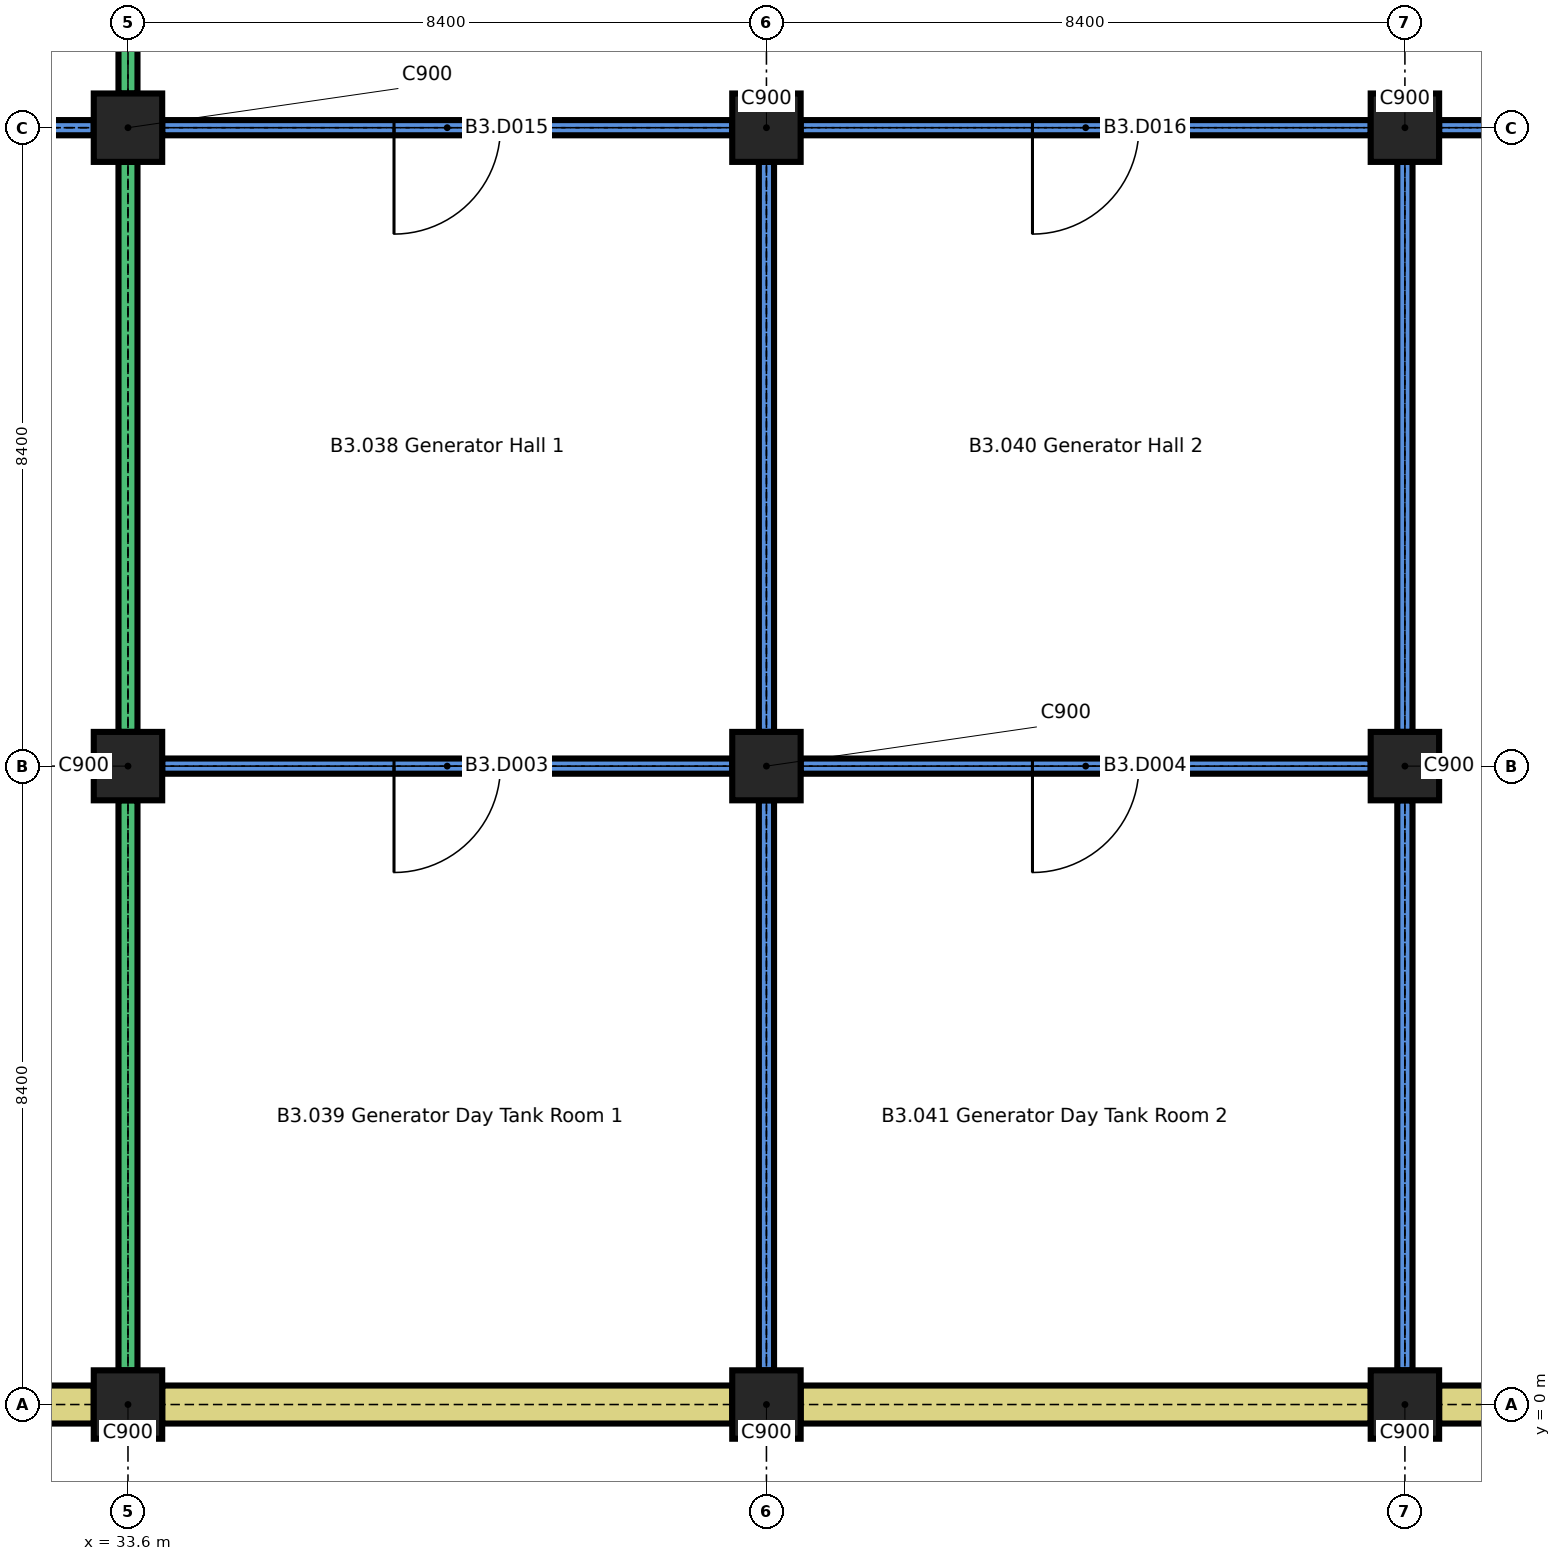
"""IFC4 building model, lengths in metres.
Left out: names, types, materials, properties, quantities, classifications, styles, units other than length and angle.
Written with IfcOpenShell. Run it as: python <this file> out.ifc"""

import sys

from ifc_helpers import new_model, si_unit, direction, frame, frame_2d, origin, origin_2d, place, context, subcontext, project, spatial, rectangle, extrude, element, fill, save


model = new_model("IFC4")
c1 = context("Model", 3, precision=1e-05, world=origin(), true_north=direction((0.0, 1.0)))
c2 = subcontext(c1, "Body", "Model", "MODEL_VIEW")
j1 = project(units=[si_unit("LENGTHUNIT", "METRE"), si_unit("PLANEANGLEUNIT", "RADIAN")], contexts=[c1])
p1 = place(None, origin())
s1 = spatial("IfcSite", under=j1, at=p1, CompositionType="ELEMENT")
p2 = place(p1, origin())
s2 = spatial("IfcBuilding", under=s1, at=p2, CompositionType="ELEMENT")
p3 = place(p2, frame((0.0, 0.0, -11.4)))
s3 = spatial("IfcBuildingStorey", under=s2, at=p3, CompositionType="ELEMENT", Elevation=-11.4)
for number, where, z_axis, x_axis in (
    (1, (33.6, 0.0, 0.0), (0.0, 0.0, 1.0), (1.0, 0.0, 0.0)),
    (2, (42.0, 0.0, 0.0), (0.0, 0.0, 1.0), (1.0, 0.0, 0.0)),
    (3, (50.4, 0.0, 0.0), (0.0, 0.0, 1.0), (1.0, 0.0, 0.0)),
    (4, (33.6, 8.4, 0.0), (0.0, 0.0, 1.0), (1.0, 0.0, 0.0)),
    (5, (42.0, 8.4, 0.0), (0.0, 0.0, 1.0), (1.0, 0.0, 0.0)),
    (6, (50.4, 8.4, 0.0), (0.0, 0.0, 1.0), (1.0, 0.0, 0.0)),
    (7, (33.6, 16.8, 0.0), (0.0, 0.0, 1.0), (1.0, 0.0, 0.0)),
    (8, (42.0, 16.8, 0.0), (0.0, 0.0, 1.0), (1.0, 0.0, 0.0)),
    (9, (50.4, 16.8, 0.0), (0.0, 0.0, 1.0), (1.0, 0.0, 0.0)),
):
    element("IfcColumn", number, at=place(p3, frame(where, z_axis=z_axis, x_axis=x_axis)), inside=s3, PredefinedType="COLUMN", context=c2, shape_type="SweptSolid", body=[
        extrude(rectangle(XDim=0.9, YDim=0.9, at=origin_2d()), origin(), (0.0, 0.0, 1.0), 3.2),
    ])
for number, where, z_axis, x_axis in (
    (10, (25.65, 0.0, 0.0), (0.0, 0.0, 1.0), (1.0, 0.0, 0.0)),
    (11, (34.05, 0.0, 0.0), (0.0, 0.0, 1.0), (1.0, 0.0, 0.0)),
    (12, (42.45, 0.0, 0.0), (0.0, 0.0, 1.0), (1.0, 0.0, 0.0)),
    (13, (50.85, 0.0, 0.0), (0.0, 0.0, 1.0), (1.0, 0.0, 0.0)),
):
    element("IfcWall", number, at=place(p3, frame(where, z_axis=z_axis, x_axis=x_axis)), inside=s3, PredefinedType="SOLIDWALL", context=c2, shape_type="SweptSolid", body=[
        extrude(rectangle(XDim=7.5, YDim=0.5, at=frame_2d((3.75, 0.0))), origin(), (0.0, 0.0, 1.0), 3.2),
    ])
p4 = place(p3, frame((34.05, 8.4, 0.0), z_axis=(0.0, 0.0, 1.0), x_axis=(1.0, 0.0, 0.0)))
e14 = element("IfcWall", 14, at=p4, inside=s3, PredefinedType="PARTITIONING", context=c2, shape_type="SweptSolid", body=[
    extrude(rectangle(XDim=7.5, YDim=0.2, at=frame_2d((3.75, 0.0))), origin(), (0.0, 0.0, 1.0), 3.2),
])
p5 = place(p4, frame((3.05, 0.0, 0.0)))
e15 = element("IfcOpeningElement", 15, at=p5, cuts=e14, PredefinedType="OPENING", context=c2, shape_type="SweptSolid", body=[
    extrude(rectangle(XDim=1.4, YDim=2.1, at=frame_2d((0.7, 1.05))), frame((0.0, 0.11, 0.0), z_axis=(0.0, -1.0, 0.0), x_axis=(1.0, 0.0, 0.0)), (0.0, 0.0, 1.0), 0.22),
])
p6 = place(p3, frame((42.45, 8.4, 0.0), z_axis=(0.0, 0.0, 1.0), x_axis=(1.0, 0.0, 0.0)))
e16 = element("IfcWall", 16, at=p6, inside=s3, PredefinedType="PARTITIONING", context=c2, shape_type="SweptSolid", body=[
    extrude(rectangle(XDim=7.5, YDim=0.2, at=frame_2d((3.75, 0.0))), origin(), (0.0, 0.0, 1.0), 3.2),
])
p7 = place(p6, frame((3.05, 0.0, 0.0)))
e17 = element("IfcOpeningElement", 17, at=p7, cuts=e16, PredefinedType="OPENING", context=c2, shape_type="SweptSolid", body=[
    extrude(rectangle(XDim=1.4, YDim=2.1, at=frame_2d((0.7, 1.05))), frame((0.0, 0.11, 0.0), z_axis=(0.0, -1.0, 0.0), x_axis=(1.0, 0.0, 0.0)), (0.0, 0.0, 1.0), 0.22),
])
p8 = place(p3, frame((17.25, 16.8, 0.0), z_axis=(0.0, 0.0, 1.0), x_axis=(1.0, 0.0, 0.0)))
e18 = element("IfcWall", 18, at=p8, inside=s3, PredefinedType="PARTITIONING", context=c2, shape_type="SweptSolid", body=[
    extrude(rectangle(XDim=15.9, YDim=0.2, at=frame_2d((7.95, 0.0))), origin(), (0.0, 0.0, 1.0), 3.2),
])
p9 = place(p8, frame((3.275, 0.0, 0.0)))
e19 = element("IfcOpeningElement", 19, at=p9, cuts=e18, PredefinedType="OPENING", context=c2, shape_type="SweptSolid", body=[
    extrude(rectangle(XDim=1.4, YDim=2.1, at=frame_2d((0.7, 1.05))), frame((0.0, 0.11, 0.0), z_axis=(0.0, -1.0, 0.0), x_axis=(1.0, 0.0, 0.0)), (0.0, 0.0, 1.0), 0.22),
])
p10 = place(p8, frame((13.325, 0.0, 0.0)))
e20 = element("IfcOpeningElement", 20, at=p10, cuts=e18, PredefinedType="OPENING", context=c2, shape_type="SweptSolid", body=[
    extrude(rectangle(XDim=1.4, YDim=2.1, at=frame_2d((0.7, 1.05))), frame((0.0, 0.11, 0.0), z_axis=(0.0, -1.0, 0.0), x_axis=(1.0, 0.0, 0.0)), (0.0, 0.0, 1.0), 0.22),
])
p11 = place(p3, frame((34.05, 16.8, 0.0), z_axis=(0.0, 0.0, 1.0), x_axis=(1.0, 0.0, 0.0)))
e21 = element("IfcWall", 21, at=p11, inside=s3, PredefinedType="PARTITIONING", context=c2, shape_type="SweptSolid", body=[
    extrude(rectangle(XDim=7.5, YDim=0.2, at=frame_2d((3.75, 0.0))), origin(), (0.0, 0.0, 1.0), 3.2),
])
p12 = place(p11, frame((3.05, 0.0, 0.0)))
e22 = element("IfcOpeningElement", 22, at=p12, cuts=e21, PredefinedType="OPENING", context=c2, shape_type="SweptSolid", body=[
    extrude(rectangle(XDim=1.4, YDim=2.1, at=frame_2d((0.7, 1.05))), frame((0.0, 0.11, 0.0), z_axis=(0.0, -1.0, 0.0), x_axis=(1.0, 0.0, 0.0)), (0.0, 0.0, 1.0), 0.22),
])
p13 = place(p3, frame((42.45, 16.8, 0.0), z_axis=(0.0, 0.0, 1.0), x_axis=(1.0, 0.0, 0.0)))
e23 = element("IfcWall", 23, at=p13, inside=s3, PredefinedType="PARTITIONING", context=c2, shape_type="SweptSolid", body=[
    extrude(rectangle(XDim=7.5, YDim=0.2, at=frame_2d((3.75, 0.0))), origin(), (0.0, 0.0, 1.0), 3.2),
])
p14 = place(p13, frame((3.05, 0.0, 0.0)))
e24 = element("IfcOpeningElement", 24, at=p14, cuts=e23, PredefinedType="OPENING", context=c2, shape_type="SweptSolid", body=[
    extrude(rectangle(XDim=1.4, YDim=2.1, at=frame_2d((0.7, 1.05))), frame((0.0, 0.11, 0.0), z_axis=(0.0, -1.0, 0.0), x_axis=(1.0, 0.0, 0.0)), (0.0, 0.0, 1.0), 0.22),
])
p15 = place(p3, frame((50.85, 16.8, 0.0), z_axis=(0.0, 0.0, 1.0), x_axis=(1.0, 0.0, 0.0)))
e25 = element("IfcWall", 25, at=p15, inside=s3, PredefinedType="PARTITIONING", context=c2, shape_type="SweptSolid", body=[
    extrude(rectangle(XDim=7.5, YDim=0.2, at=frame_2d((3.75, 0.0))), origin(), (0.0, 0.0, 1.0), 3.2),
])
p16 = place(p15, frame((3.05, 0.0, 0.0)))
e26 = element("IfcOpeningElement", 26, at=p16, cuts=e25, PredefinedType="OPENING", context=c2, shape_type="SweptSolid", body=[
    extrude(rectangle(XDim=1.4, YDim=2.1, at=frame_2d((0.7, 1.05))), frame((0.0, 0.11, 0.0), z_axis=(0.0, -1.0, 0.0), x_axis=(1.0, 0.0, 0.0)), (0.0, 0.0, 1.0), 0.22),
])
for number, where, z_axis, x_axis in (
    (27, (33.6, 0.45, 0.0), (0.0, 0.0, 1.0), (0.0, 1.0, 0.0)),
    (28, (33.6, 8.85, 0.0), (0.0, 0.0, 1.0), (0.0, 1.0, 0.0)),
):
    element("IfcWall", number, at=place(p3, frame(where, z_axis=z_axis, x_axis=x_axis)), inside=s3, PredefinedType="SOLIDWALL", context=c2, shape_type="SweptSolid", body=[
        extrude(rectangle(XDim=7.5, YDim=0.25, at=frame_2d((3.75, 0.0))), origin(), (0.0, 0.0, 1.0), 3.2),
    ])
p17 = place(p3, frame((33.6, 17.25, 0.0), z_axis=(0.0, 0.0, 1.0), x_axis=(0.0, 1.0, 0.0)))
e29 = element("IfcWall", 29, at=p17, inside=s3, PredefinedType="SOLIDWALL", context=c2, shape_type="SweptSolid", body=[
    extrude(rectangle(XDim=4.25, YDim=0.25, at=frame_2d((2.125, 0.0))), origin(), (0.0, 0.0, 1.0), 3.2),
])
p18 = place(p17, frame((1.425, 0.0, 0.0)))
e30 = element("IfcOpeningElement", 30, at=p18, cuts=e29, PredefinedType="OPENING", context=c2, shape_type="SweptSolid", body=[
    extrude(rectangle(XDim=1.4, YDim=2.1, at=frame_2d((0.7, 1.05))), frame((0.0, 0.135, 0.0), z_axis=(0.0, -1.0, 0.0), x_axis=(1.0, 0.0, 0.0)), (0.0, 0.0, 1.0), 0.27),
])
for number, where, z_axis, x_axis in (
    (31, (42.0, 0.45, 0.0), (0.0, 0.0, 1.0), (0.0, 1.0, 0.0)),
    (32, (42.0, 8.85, 0.0), (0.0, 0.0, 1.0), (0.0, 1.0, 0.0)),
    (33, (50.4, 0.45, 0.0), (0.0, 0.0, 1.0), (0.0, 1.0, 0.0)),
    (34, (50.4, 8.85, 0.0), (0.0, 0.0, 1.0), (0.0, 1.0, 0.0)),
):
    element("IfcWall", number, at=place(p3, frame(where, z_axis=z_axis, x_axis=x_axis)), inside=s3, PredefinedType="PARTITIONING", context=c2, shape_type="SweptSolid", body=[
        extrude(rectangle(XDim=7.5, YDim=0.2, at=frame_2d((3.75, 0.0))), origin(), (0.0, 0.0, 1.0), 3.2),
    ])
p19 = place(p5, origin())
e35 = element("IfcDoor", 35, at=p19, inside=s3, OperationType="SINGLE_SWING_LEFT", PredefinedType="DOOR", context=c2, shape_type="SweptSolid", body=[
    extrude(rectangle(XDim=1.4, YDim=2.1, at=frame_2d((0.7, 1.05))), frame((0.0, 0.025, 0.0), z_axis=(0.0, -1.0, 0.0), x_axis=(1.0, 0.0, 0.0)), (0.0, 0.0, 1.0), 0.05),
])
fill(e15, e35)
p20 = place(p7, origin())
e36 = element("IfcDoor", 36, at=p20, inside=s3, OperationType="SINGLE_SWING_LEFT", PredefinedType="DOOR", context=c2, shape_type="SweptSolid", body=[
    extrude(rectangle(XDim=1.4, YDim=2.1, at=frame_2d((0.7, 1.05))), frame((0.0, 0.025, 0.0), z_axis=(0.0, -1.0, 0.0), x_axis=(1.0, 0.0, 0.0)), (0.0, 0.0, 1.0), 0.05),
])
fill(e17, e36)
p21 = place(p12, origin())
e37 = element("IfcDoor", 37, at=p21, inside=s3, OperationType="SINGLE_SWING_LEFT", PredefinedType="DOOR", context=c2, shape_type="SweptSolid", body=[
    extrude(rectangle(XDim=1.4, YDim=2.1, at=frame_2d((0.7, 1.05))), frame((0.0, 0.025, 0.0), z_axis=(0.0, -1.0, 0.0), x_axis=(1.0, 0.0, 0.0)), (0.0, 0.0, 1.0), 0.05),
])
fill(e22, e37)
p22 = place(p14, origin())
e38 = element("IfcDoor", 38, at=p22, inside=s3, OperationType="SINGLE_SWING_LEFT", PredefinedType="DOOR", context=c2, shape_type="SweptSolid", body=[
    extrude(rectangle(XDim=1.4, YDim=2.1, at=frame_2d((0.7, 1.05))), frame((0.0, 0.025, 0.0), z_axis=(0.0, -1.0, 0.0), x_axis=(1.0, 0.0, 0.0)), (0.0, 0.0, 1.0), 0.05),
])
fill(e24, e38)
save(model, sys.argv[1])
